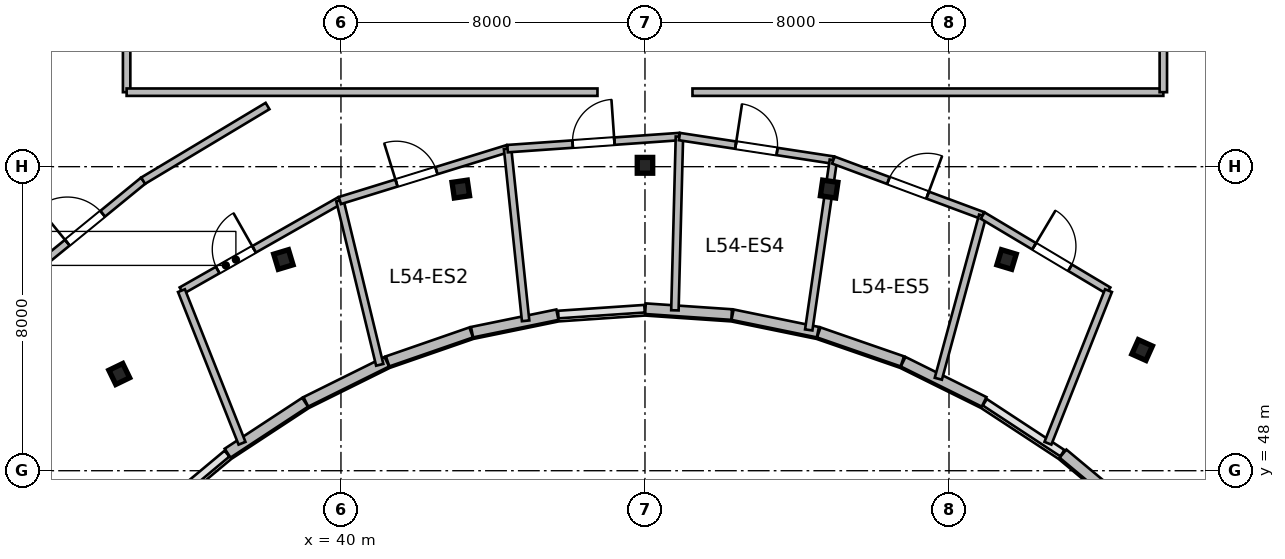
"""IFC4 building model, lengths in metres.
Left out: names, types, materials, properties, quantities, classifications, styles, units other than length and angle.
Written with IfcOpenShell. Run it as: python <this file> out.ifc"""

import sys

from ifc_helpers import new_model, si_unit, direction, frame, frame_2d, origin, origin_2d, place, context, subcontext, project, spatial, rectangle, i_section, extrude, source, transform, mapped, element, fill, save


model = new_model("IFC4")
c1 = context("Model", 3, precision=1e-05, world=origin(), true_north=direction((0.0, 1.0)))
c2 = subcontext(c1, "Body", "Model", "MODEL_VIEW")
j1 = project(units=[si_unit("LENGTHUNIT", "METRE"), si_unit("PLANEANGLEUNIT", "RADIAN")], contexts=[c1])
p1 = place(None, origin())
s1 = spatial("IfcSite", under=j1, at=p1, CompositionType="ELEMENT")
p2 = place(p1, origin())
s2 = spatial("IfcBuilding", under=s1, at=p2, CompositionType="ELEMENT")
p3 = place(p2, frame((0.0, 0.0, 223.5)))
s3 = spatial("IfcBuildingStorey", under=s2, at=p3, CompositionType="ELEMENT", Elevation=223.5)
m1 = source(origin(), c2, "Body", "SweptSolid", [
    extrude(i_section(OverallWidth=0.406, OverallDepth=0.416, WebThickness=0.03, FlangeThickness=0.048, at=origin_2d()), origin(), (0.0, 0.0, 1.0), 3.9),
])
for number, where, z_axis, x_axis in (
    (1, (34.166, 50.545, 0.0), (0.0, 0.0, 1.0), (-0.436, 0.9, 0.0)),
    (2, (38.485, 53.558, 0.0), (0.0, 0.0, 1.0), (-0.289, 0.957, 0.0)),
    (3, (43.154, 55.411, 0.0), (0.0, 0.0, 1.0), (-0.143, 0.99, 0.0)),
    (4, (48.0, 56.036, 0.0), (0.0, 0.0, 1.0), (0.0, 1.0, 0.0)),
    (5, (52.846, 55.411, 0.0), (0.0, 0.0, 1.0), (0.143, 0.99, 0.0)),
    (6, (57.515, 53.558, 0.0), (0.0, 0.0, 1.0), (0.289, 0.957, 0.0)),
    (7, (61.082, 51.175, 0.0), (0.0, 0.0, 1.0), (0.409, 0.912, 0.0)),
):
    element("IfcColumn", number, at=place(p3, frame(where, z_axis=z_axis, x_axis=x_axis)), inside=s3, PredefinedType="COLUMN", context=c2, shape_type="MappedRepresentation", body=[
        mapped(m1, transform((0.0, 0.0, 0.0), scale=1.0)),
    ])
m2 = source(origin(), c2, "Body", "SweptSolid", [
    extrude(rectangle(XDim=2.511, YDim=0.28, at=frame_2d((1.256, 0.0))), origin(), (0.0, 0.0, 1.0), 3.64),
])
p4 = place(p3, frame((60.928, 46.841, 0.0), z_axis=(0.0, 0.0, 1.0), x_axis=(-0.767910416122, 0.640557251782, 0.0)))
e8 = element("IfcWall", 8, at=p4, inside=s3, PredefinedType="SOLIDWALL", context=c2, shape_type="MappedRepresentation", body=[
    mapped(m2, transform((0.0, 0.0, 0.0), scale=1.0)),
])
m3 = source(origin(), c2, "Body", "SweptSolid", [
    extrude(rectangle(XDim=2.378, YDim=0.28, at=frame_2d((1.189, 0.0))), origin(), (0.0, 0.0, 1.0), 3.64),
])
p5 = place(p3, frame((56.924, 49.812, 0.0), z_axis=(0.0, 0.0, 1.0), x_axis=(-0.895941616831, 0.444171835252, 0.0)))
e9 = element("IfcWall", 9, at=p5, inside=s3, PredefinedType="SOLIDWALL", context=c2, shape_type="MappedRepresentation", body=[
    mapped(m3, transform((0.0, 0.0, 0.0), scale=1.0)),
])
m4 = source(origin(), c2, "Body", "SweptSolid", [
    extrude(rectangle(XDim=2.328, YDim=0.28, at=frame_2d((1.164, 0.0))), origin(), (0.0, 0.0, 1.0), 3.64),
])
p6 = place(p3, frame((54.772, 50.876, 0.0), z_axis=(0.0, 0.0, 1.0), x_axis=(-0.944872545641, 0.32743834915, 0.0)))
e10 = element("IfcWall", 10, at=p6, inside=s3, PredefinedType="SOLIDWALL", context=c2, shape_type="MappedRepresentation", body=[
    mapped(m4, transform((0.0, 0.0, 0.0), scale=1.0)),
])
m5 = source(origin(), c2, "Body", "SweptSolid", [
    extrude(rectangle(XDim=2.292, YDim=0.28, at=frame_2d((1.146, 0.0))), origin(), (0.0, 0.0, 1.0), 3.64),
])
p7 = place(p3, frame((52.55, 51.645, 0.0), z_axis=(0.0, 0.0, 1.0), x_axis=(-0.979635482689, 0.200784264963, 0.0)))
e11 = element("IfcWall", 11, at=p7, inside=s3, PredefinedType="SOLIDWALL", context=c2, shape_type="MappedRepresentation", body=[
    mapped(m5, transform((0.0, 0.0, 0.0), scale=1.0)),
])
m6 = source(origin(), c2, "Body", "SweptSolid", [
    extrude(rectangle(XDim=2.274, YDim=0.28, at=frame_2d((1.137, 0.0))), origin(), (0.0, 0.0, 1.0), 3.64),
])
p8 = place(p3, frame((50.281, 52.109, 0.0), z_axis=(0.0, 0.0, 1.0), x_axis=(-0.997702696995, 0.067744582138, 0.0)))
e12 = element("IfcWall", 12, at=p8, inside=s3, PredefinedType="SOLIDWALL", context=c2, shape_type="MappedRepresentation", body=[
    mapped(m6, transform((0.0, 0.0, 0.0), scale=1.0)),
])
p9 = place(p3, frame((45.695, 52.105, 0.0), z_axis=(0.0, 0.0, 1.0), x_axis=(-0.979635482689, -0.200784264963, 0.0)))
e13 = element("IfcWall", 13, at=p9, inside=s3, PredefinedType="SOLIDWALL", context=c2, shape_type="MappedRepresentation", body=[
    mapped(m5, transform((0.0, 0.0, 0.0), scale=1.0)),
])
p10 = place(p3, frame((43.427, 51.639, 0.0), z_axis=(0.0, 0.0, 1.0), x_axis=(-0.944872545641, -0.32743834915, 0.0)))
e14 = element("IfcWall", 14, at=p10, inside=s3, PredefinedType="SOLIDWALL", context=c2, shape_type="MappedRepresentation", body=[
    mapped(m4, transform((0.0, 0.0, 0.0), scale=1.0)),
])
p11 = place(p3, frame((41.207, 50.868, 0.0), z_axis=(0.0, 0.0, 1.0), x_axis=(-0.895941616831, -0.444171835252, 0.0)))
e15 = element("IfcWall", 15, at=p11, inside=s3, PredefinedType="SOLIDWALL", context=c2, shape_type="MappedRepresentation", body=[
    mapped(m3, transform((0.0, 0.0, 0.0), scale=1.0)),
])
m7 = source(origin(), c2, "Body", "SweptSolid", [
    extrude(rectangle(XDim=2.44, YDim=0.28, at=frame_2d((1.22, 0.0))), origin(), (0.0, 0.0, 1.0), 3.64),
])
p12 = place(p3, frame((39.057, 49.801, 0.0), z_axis=(0.0, 0.0, 1.0), x_axis=(-0.83598480459, -0.548752591333, 0.0)))
e16 = element("IfcWall", 16, at=p12, inside=s3, PredefinedType="SOLIDWALL", context=c2, shape_type="MappedRepresentation", body=[
    mapped(m7, transform((0.0, 0.0, 0.0), scale=1.0)),
])
m8 = source(origin(), c2, "Body", "SweptSolid", [
    extrude(rectangle(XDim=4.796, YDim=0.195, at=frame_2d((2.398, 0.0))), origin(), (0.0, 0.0, 1.0), 3.64),
])
p13 = place(p3, frame((35.803, 52.738, 0.0), z_axis=(0.0, 0.0, 1.0), x_axis=(0.869231352707, 0.494405557686, 0.0)))
e17 = element("IfcWall", 17, at=p13, inside=s3, PredefinedType="PARTITIONING", context=c2, shape_type="MappedRepresentation", body=[
    mapped(m8, transform((0.0, 0.0, 0.0), scale=1.0)),
])
p14 = place(p13, frame((1.098, 0.0, 0.0)))
e18 = element("IfcOpeningElement", 18, at=p14, cuts=e17, PredefinedType="OPENING", context=c2, shape_type="SweptSolid", body=[
    extrude(rectangle(XDim=1.1, YDim=2.15, at=frame_2d((0.55, 1.075))), frame((0.0, 0.107, 0.0), z_axis=(0.0, -1.0, 0.0), x_axis=(1.0, 0.0, 0.0)), (0.0, 0.0, 1.0), 0.215),
])
m9 = source(origin(), c2, "Body", "SweptSolid", [
    extrude(rectangle(XDim=4.32, YDim=0.195, at=frame_2d((2.16, 0.0))), origin(), (0.0, 0.0, 1.0), 3.64),
])
p15 = place(p3, frame((37.396, 48.723, 0.0), z_axis=(0.0, 0.0, 1.0), x_axis=(-0.368846295269, 0.929490403644, 0.0)))
e19 = element("IfcWall", 19, at=p15, inside=s3, PredefinedType="PARTITIONING", context=c2, shape_type="MappedRepresentation", body=[
    mapped(m9, transform((0.0, 0.0, 0.0), scale=1.0)),
])
m10 = source(origin(), c2, "Body", "SweptSolid", [
    extrude(rectangle(XDim=4.448, YDim=0.195, at=frame_2d((2.224, 0.0))), origin(), (0.0, 0.0, 1.0), 3.64),
])
p16 = place(p3, frame((41.02, 50.786, 0.0), z_axis=(0.0, 0.0, 1.0), x_axis=(-0.235672283469, 0.971832585791, 0.0)))
e20 = element("IfcWall", 20, at=p16, inside=s3, PredefinedType="PARTITIONING", context=c2, shape_type="MappedRepresentation", body=[
    mapped(m10, transform((0.0, 0.0, 0.0), scale=1.0)),
])
m11 = source(origin(), c2, "Body", "SweptSolid", [
    extrude(rectangle(XDim=4.619, YDim=0.195, at=frame_2d((2.31, 0.0))), origin(), (0.0, 0.0, 1.0), 3.64),
])
p17 = place(p3, frame((39.972, 55.109, 0.0), z_axis=(0.0, 0.0, 1.0), x_axis=(0.955335644135, 0.295522938274, 0.0)))
e21 = element("IfcWall", 21, at=p17, inside=s3, PredefinedType="PARTITIONING", context=c2, shape_type="MappedRepresentation", body=[
    mapped(m11, transform((0.0, 0.0, 0.0), scale=1.0)),
])
p18 = place(p17, frame((1.56, 0.0, 0.0)))
e22 = element("IfcOpeningElement", 22, at=p18, cuts=e21, PredefinedType="OPENING", context=c2, shape_type="SweptSolid", body=[
    extrude(rectangle(XDim=1.1, YDim=2.15, at=frame_2d((0.55, 1.075))), frame((0.0, 0.107, 0.0), z_axis=(0.0, -1.0, 0.0), x_axis=(1.0, 0.0, 0.0)), (0.0, 0.0, 1.0), 0.215),
])
m12 = source(origin(), c2, "Body", "SweptSolid", [
    extrude(rectangle(XDim=4.555, YDim=0.195, at=frame_2d((2.278, 0.0))), origin(), (0.0, 0.0, 1.0), 3.64),
])
p19 = place(p3, frame((44.859, 51.944, 0.0), z_axis=(0.0, 0.0, 1.0), x_axis=(-0.104299759329, 0.994545906534, 0.0)))
e23 = element("IfcWall", 23, at=p19, inside=s3, PredefinedType="PARTITIONING", context=c2, shape_type="MappedRepresentation", body=[
    mapped(m12, transform((0.0, 0.0, 0.0), scale=1.0)),
])
m13 = source(origin(), c2, "Body", "SweptSolid", [
    extrude(rectangle(XDim=4.534, YDim=0.195, at=frame_2d((2.267, 0.0))), origin(), (0.0, 0.0, 1.0), 3.64),
])
p20 = place(p3, frame((44.384, 56.474, 0.0), z_axis=(0.0, 0.0, 1.0), x_axis=(0.997542735031, 0.070060629361, 0.0)))
e24 = element("IfcWall", 24, at=p20, inside=s3, PredefinedType="PARTITIONING", context=c2, shape_type="MappedRepresentation", body=[
    mapped(m13, transform((0.0, 0.0, 0.0), scale=1.0)),
])
p21 = place(p20, frame((1.717, 0.0, 0.0)))
e25 = element("IfcOpeningElement", 25, at=p21, cuts=e24, PredefinedType="OPENING", context=c2, shape_type="SweptSolid", body=[
    extrude(rectangle(XDim=1.1, YDim=2.15, at=frame_2d((0.55, 1.075))), frame((0.0, 0.107, 0.0), z_axis=(0.0, -1.0, 0.0), x_axis=(1.0, 0.0, 0.0)), (0.0, 0.0, 1.0), 0.215),
])
m14 = source(origin(), c2, "Body", "SweptSolid", [
    extrude(rectangle(XDim=4.573, YDim=0.195, at=frame_2d((2.287, 0.0))), origin(), (0.0, 0.0, 1.0), 3.64),
])
p22 = place(p3, frame((48.788, 52.22, 0.0), z_axis=(0.0, 0.0, 1.0), x_axis=(0.026049788838, 0.99966064667, 0.0)))
e26 = element("IfcWall", 26, at=p22, inside=s3, PredefinedType="PARTITIONING", context=c2, shape_type="MappedRepresentation", body=[
    mapped(m14, transform((0.0, 0.0, 0.0), scale=1.0)),
])
m15 = source(origin(), c2, "Body", "SweptSolid", [
    extrude(rectangle(XDim=4.097, YDim=0.195, at=frame_2d((2.049, 0.0))), origin(), (0.0, 0.0, 1.0), 3.64),
])
p23 = place(p3, frame((48.907, 56.792, 0.0), z_axis=(0.0, 0.0, 1.0), x_axis=(0.988545320847, -0.150924314249, 0.0)))
e27 = element("IfcWall", 27, at=p23, inside=s3, PredefinedType="PARTITIONING", context=c2, shape_type="MappedRepresentation", body=[
    mapped(m15, transform((0.0, 0.0, 0.0), scale=1.0)),
])
p24 = place(p23, frame((1.499, 0.0, 0.0)))
e28 = element("IfcOpeningElement", 28, at=p24, cuts=e27, PredefinedType="OPENING", context=c2, shape_type="SweptSolid", body=[
    extrude(rectangle(XDim=1.1, YDim=2.15, at=frame_2d((0.55, 1.075))), frame((0.0, 0.107, 0.0), z_axis=(0.0, -1.0, 0.0), x_axis=(1.0, 0.0, 0.0)), (0.0, 0.0, 1.0), 0.215),
])
m16 = source(origin(), c2, "Body", "SweptSolid", [
    extrude(rectangle(XDim=4.516, YDim=0.195, at=frame_2d((2.258, 0.0))), origin(), (0.0, 0.0, 1.0), 3.085),
])
p25 = place(p3, frame((52.309, 51.705, 0.0), z_axis=(0.0, 0.0, 1.0), x_axis=(0.143540347267, 0.989644465809, 0.0)))
e29 = element("IfcWall", 29, at=p25, inside=s3, PredefinedType="PARTITIONING", context=c2, shape_type="MappedRepresentation", body=[
    mapped(m16, transform((0.0, 0.0, 0.0), scale=1.0)),
])
m17 = source(origin(), c2, "Body", "SweptSolid", [
    extrude(rectangle(XDim=4.191, YDim=0.195, at=frame_2d((2.095, 0.0))), origin(), (0.0, 0.0, 1.0), 3.64),
])
p26 = place(p3, frame((52.957, 56.174, 0.0), z_axis=(0.0, 0.0, 1.0), x_axis=(0.937361695407, -0.348357649527, 0.0)))
e30 = element("IfcWall", 30, at=p26, inside=s3, PredefinedType="PARTITIONING", context=c2, shape_type="MappedRepresentation", body=[
    mapped(m17, transform((0.0, 0.0, 0.0), scale=1.0)),
])
p27 = place(p26, frame((1.545, 0.0, 0.0)))
e31 = element("IfcOpeningElement", 31, at=p27, cuts=e30, PredefinedType="OPENING", context=c2, shape_type="SweptSolid", body=[
    extrude(rectangle(XDim=1.1, YDim=2.15, at=frame_2d((0.55, 1.075))), frame((0.0, 0.107, 0.0), z_axis=(0.0, -1.0, 0.0), x_axis=(1.0, 0.0, 0.0)), (0.0, 0.0, 1.0), 0.215),
])
m18 = source(origin(), c2, "Body", "SweptSolid", [
    extrude(rectangle(XDim=4.449, YDim=0.195, at=frame_2d((2.225, 0.0))), origin(), (0.0, 0.0, 1.0), 3.64),
])
p28 = place(p3, frame((55.719, 50.42, 0.0), z_axis=(0.0, 0.0, 1.0), x_axis=(0.262123660516, 0.965034292965, 0.0)))
e32 = element("IfcWall", 32, at=p28, inside=s3, PredefinedType="PARTITIONING", context=c2, shape_type="MappedRepresentation", body=[
    mapped(m18, transform((0.0, 0.0, 0.0), scale=1.0)),
])
m19 = source(origin(), c2, "Body", "SweptSolid", [
    extrude(rectangle(XDim=3.856, YDim=0.195, at=frame_2d((1.928, 0.0))), origin(), (0.0, 0.0, 1.0), 3.64),
])
p29 = place(p3, frame((56.886, 54.714, 0.0), z_axis=(0.0, 0.0, 1.0), x_axis=(0.858797511375, -0.512315171019, 0.0)))
e33 = element("IfcWall", 33, at=p29, inside=s3, PredefinedType="PARTITIONING", context=c2, shape_type="MappedRepresentation", body=[
    mapped(m19, transform((0.0, 0.0, 0.0), scale=1.0)),
])
p30 = place(p29, frame((1.578, 0.0, 0.0)))
e34 = element("IfcOpeningElement", 34, at=p30, cuts=e33, PredefinedType="OPENING", context=c2, shape_type="SweptSolid", body=[
    extrude(rectangle(XDim=1.1, YDim=2.15, at=frame_2d((0.55, 1.075))), frame((0.0, 0.107, 0.0), z_axis=(0.0, -1.0, 0.0), x_axis=(1.0, 0.0, 0.0)), (0.0, 0.0, 1.0), 0.215),
])
p31 = place(p3, frame((58.604, 48.723, 0.0), z_axis=(0.0, 0.0, 1.0), x_axis=(0.368846295269, 0.929490403644, 0.0)))
e35 = element("IfcWall", 35, at=p31, inside=s3, PredefinedType="PARTITIONING", context=c2, shape_type="MappedRepresentation", body=[
    mapped(m9, transform((0.0, 0.0, 0.0), scale=1.0)),
])
m20 = source(origin(), c2, "Body", "SweptSolid", [
    extrude(rectangle(XDim=3.954, YDim=0.195, at=frame_2d((1.977, 0.0))), origin(), (0.0, 0.0, 1.0), 3.64),
])
p32 = place(p3, frame((31.733, 53.13, 0.0), z_axis=(0.0, 0.0, 1.0), x_axis=(0.774345047596, 0.632763579281, 0.0)))
e36 = element("IfcWall", 36, at=p32, inside=s3, PredefinedType="PARTITIONING", context=c2, shape_type="MappedRepresentation", body=[
    mapped(m20, transform((0.0, 0.0, 0.0), scale=1.0)),
])
p33 = place(p32, frame((1.377, 0.0, 0.0)))
e37 = element("IfcOpeningElement", 37, at=p33, cuts=e36, PredefinedType="OPENING", context=c2, shape_type="SweptSolid", body=[
    extrude(rectangle(XDim=1.2, YDim=2.15, at=frame_2d((0.6, 1.075))), frame((0.0, 0.107, 0.0), z_axis=(0.0, -1.0, 0.0), x_axis=(1.0, 0.0, 0.0)), (0.0, 0.0, 1.0), 0.215),
])
m21 = source(origin(), c2, "Body", "SweptSolid", [
    extrude(rectangle(XDim=3.817, YDim=0.195, at=frame_2d((1.909, 0.0))), origin(), (0.0, 0.0, 1.0), 3.64),
])
p34 = place(p3, frame((34.795, 55.632, 0.0), z_axis=(0.0, 0.0, 1.0), x_axis=(0.857453418218, 0.514561595522, 0.0)))
e38 = element("IfcWall", 38, at=p34, inside=s3, PredefinedType="PARTITIONING", context=c2, shape_type="MappedRepresentation", body=[
    mapped(m21, transform((0.0, 0.0, 0.0), scale=1.0)),
])
m22 = source(origin(), c2, "Body", "SweptSolid", [
    extrude(rectangle(XDim=19.209, YDim=0.195, at=frame_2d((9.604, 0.0))), origin(), (0.0, 0.0, 1.0), 3.64),
])
p35 = place(p3, frame((34.36, 57.96, 0.0), z_axis=(0.0, 0.0, 1.0), x_axis=(0.0, 1.0, 0.0)))
e39 = element("IfcWall", 39, at=p35, inside=s3, PredefinedType="PARTITIONING", context=c2, shape_type="MappedRepresentation", body=[
    mapped(m22, transform((0.0, 0.0, 0.0), scale=1.0)),
])
m23 = source(origin(), c2, "Body", "SweptSolid", [
    extrude(rectangle(XDim=12.39, YDim=0.195, at=frame_2d((6.195, 0.0))), origin(), (0.0, 0.0, 1.0), 3.64),
])
for number, where, z_axis, x_axis in (
    (40, (34.36, 57.96, 0.0), (0.0, 0.0, 1.0), (1.0, 0.0, 0.0)),
    (41, (49.25, 57.96, 0.0), (0.0, 0.0, 1.0), (1.0, 0.0, 0.0)),
):
    element("IfcWall", number, at=place(p3, frame(where, z_axis=z_axis, x_axis=x_axis)), inside=s3, PredefinedType="PARTITIONING", context=c2, shape_type="MappedRepresentation", body=[
        mapped(m23, transform((0.0, 0.0, 0.0), scale=1.0)),
    ])
m24 = source(origin(), c2, "Body", "SweptSolid", [
    extrude(rectangle(XDim=3.24, YDim=0.195, at=frame_2d((1.62, 0.0))), origin(), (0.0, 0.0, 1.0), 3.64),
])
p36 = place(p3, frame((61.64, 57.96, 0.0), z_axis=(0.0, 0.0, 1.0), x_axis=(0.0, 1.0, 0.0)))
e42 = element("IfcWall", 42, at=p36, inside=s3, PredefinedType="PARTITIONING", context=c2, shape_type="MappedRepresentation", body=[
    mapped(m24, transform((0.0, 0.0, 0.0), scale=1.0)),
])
m25 = source(origin(), c2, "Body", "SweptSolid", [
    extrude(rectangle(XDim=1.1, YDim=2.15, at=frame_2d((0.55, 1.075))), frame((0.0, 0.025, 0.0), z_axis=(0.0, -1.0, 0.0), x_axis=(1.0, 0.0, 0.0)), (0.0, 0.0, 1.0), 0.05),
])
p37 = place(p14, origin())
e43 = element("IfcDoor", 43, at=p37, inside=s3, OperationType="SINGLE_SWING_RIGHT", PredefinedType="DOOR", context=c2, shape_type="MappedRepresentation", body=[
    mapped(m25, transform((0.0, 0.0, 0.0), scale=1.0)),
])
fill(e18, e43)
p38 = place(p18, origin())
e44 = element("IfcDoor", 44, at=p38, inside=s3, OperationType="SINGLE_SWING_LEFT", PredefinedType="DOOR", context=c2, shape_type="MappedRepresentation", body=[
    mapped(m25, transform((0.0, 0.0, 0.0), scale=1.0)),
])
fill(e22, e44)
p39 = place(p21, origin())
e45 = element("IfcDoor", 45, at=p39, inside=s3, OperationType="SINGLE_SWING_RIGHT", PredefinedType="DOOR", context=c2, shape_type="MappedRepresentation", body=[
    mapped(m25, transform((0.0, 0.0, 0.0), scale=1.0)),
])
fill(e25, e45)
p40 = place(p24, origin())
e46 = element("IfcDoor", 46, at=p40, inside=s3, OperationType="SINGLE_SWING_LEFT", PredefinedType="DOOR", context=c2, shape_type="MappedRepresentation", body=[
    mapped(m25, transform((0.0, 0.0, 0.0), scale=1.0)),
])
fill(e28, e46)
p41 = place(p27, origin())
e47 = element("IfcDoor", 47, at=p41, inside=s3, OperationType="SINGLE_SWING_RIGHT", PredefinedType="DOOR", context=c2, shape_type="MappedRepresentation", body=[
    mapped(m25, transform((0.0, 0.0, 0.0), scale=1.0)),
])
fill(e31, e47)
p42 = place(p30, origin())
e48 = element("IfcDoor", 48, at=p42, inside=s3, OperationType="SINGLE_SWING_LEFT", PredefinedType="DOOR", context=c2, shape_type="MappedRepresentation", body=[
    mapped(m25, transform((0.0, 0.0, 0.0), scale=1.0)),
])
fill(e34, e48)
m26 = source(origin(), c2, "Body", "SweptSolid", [
    extrude(rectangle(XDim=1.2, YDim=2.15, at=frame_2d((0.6, 1.075))), frame((0.0, 0.025, 0.0), z_axis=(0.0, -1.0, 0.0), x_axis=(1.0, 0.0, 0.0)), (0.0, 0.0, 1.0), 0.05),
])
p43 = place(p33, origin())
e49 = element("IfcDoor", 49, at=p43, inside=s3, OperationType="SINGLE_SWING_LEFT", PredefinedType="DOOR", context=c2, shape_type="MappedRepresentation", body=[
    mapped(m26, transform((0.0, 0.0, 0.0), scale=1.0)),
])
fill(e37, e49)
save(model, sys.argv[1])
